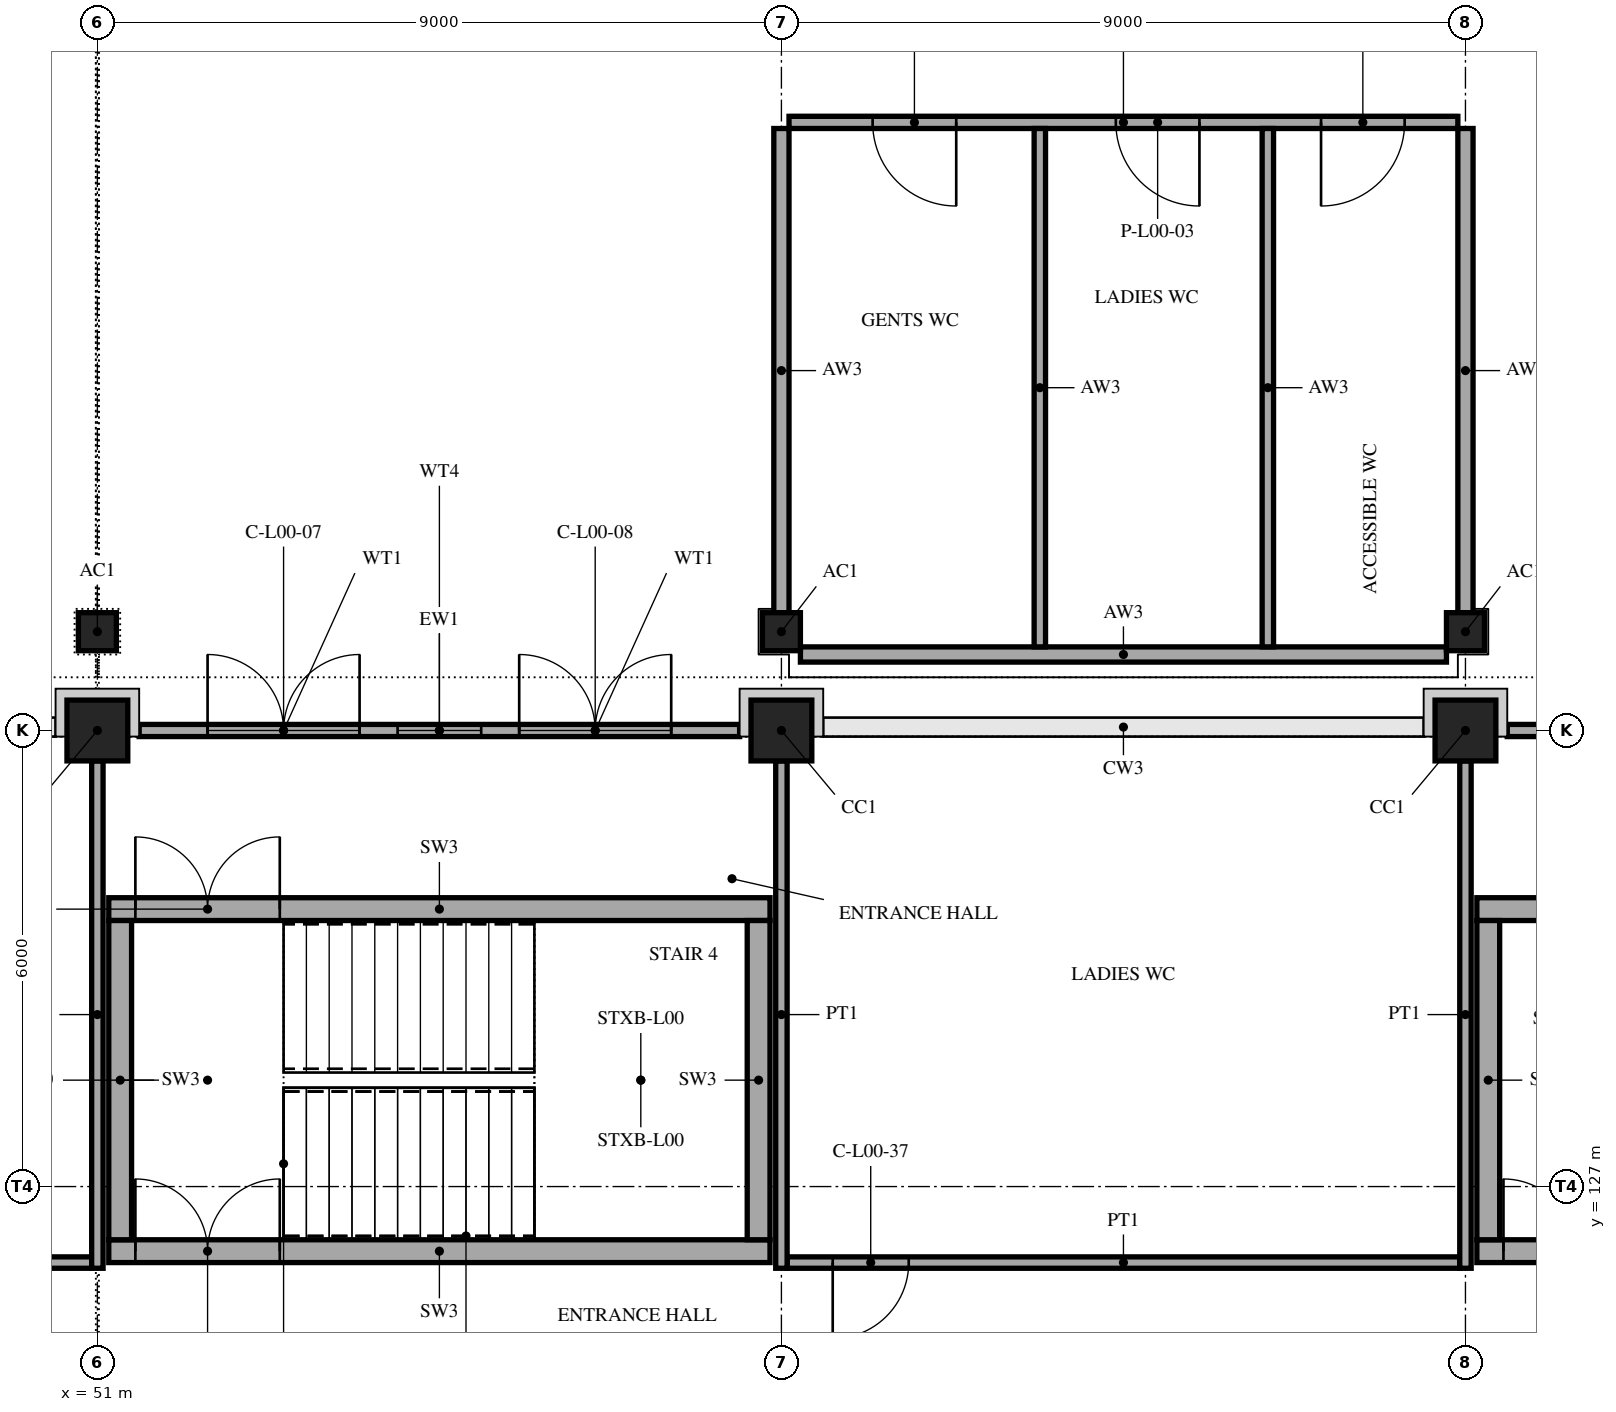
"""IFC4 building model, lengths in metres.
Left out: names, types, materials, properties, quantities, classifications, styles, units other than length and angle.
Written with IfcOpenShell. Run it as: python <this file> out.ifc"""

import sys

from ifc_helpers import new_model, si_unit, direction, frame, frame_2d, origin, origin_2d, place, context, subcontext, project, spatial, rectangle, extrude, element, fill, save


model = new_model("IFC4")
c1 = context("Model", 3, precision=1e-05, world=origin(), true_north=direction((0.0, 1.0)))
c2 = subcontext(c1, "Body", "Model", "MODEL_VIEW")
j1 = project(units=[si_unit("LENGTHUNIT", "METRE"), si_unit("PLANEANGLEUNIT", "RADIAN")], contexts=[c1])
p1 = place(None, origin())
s1 = spatial("IfcSite", under=j1, at=p1, CompositionType="ELEMENT")
p2 = place(p1, origin())
s2 = spatial("IfcBuilding", under=s1, at=p2, CompositionType="ELEMENT")
p3 = place(p2, origin())
s3 = spatial("IfcBuildingStorey", under=s2, at=p3, CompositionType="ELEMENT", Elevation=0.0)
for number, where, z_axis, x_axis in (
    (1, (51.0, 133.0, 0.0), (0.0, 0.0, 1.0), (1.0, 0.0, 0.0)),
    (2, (60.0, 133.0, 0.0), (0.0, 0.0, 1.0), (1.0, 0.0, 0.0)),
    (3, (69.0, 133.0, 0.0), (0.0, 0.0, 1.0), (1.0, 0.0, 0.0)),
):
    element("IfcColumn", number, at=place(p3, frame(where, z_axis=z_axis, x_axis=x_axis)), inside=s3, PredefinedType="COLUMN", context=c2, shape_type="SweptSolid", body=[
        extrude(rectangle(XDim=0.8, YDim=0.8, at=origin_2d()), origin(), (0.0, 0.0, 1.0), 5.0),
    ])
p4 = place(p3, frame((51.15, 126.15, 0.0), z_axis=(0.0, 0.0, 1.0), x_axis=(1.0, 0.0, 0.0)))
e4 = element("IfcWall", 4, at=p4, inside=s3, PredefinedType="SHEAR", context=c2, shape_type="SweptSolid", body=[
    extrude(rectangle(XDim=8.7, YDim=0.3, at=frame_2d((4.35, 0.0))), origin(), (0.0, 0.0, 1.0), 5.0),
])
p5 = place(p4, frame((0.35, 0.0, 0.0)))
e5 = element("IfcOpeningElement", 5, at=p5, cuts=e4, PredefinedType="OPENING", context=c2, shape_type="SweptSolid", body=[
    extrude(rectangle(XDim=1.9, YDim=2.1, at=frame_2d((0.95, 1.05))), frame((0.0, 0.16, 0.0), z_axis=(0.0, -1.0, 0.0), x_axis=(1.0, 0.0, 0.0)), (0.0, 0.0, 1.0), 0.32),
])
p6 = place(p3, frame((51.15, 130.65, 0.0), z_axis=(0.0, 0.0, 1.0), x_axis=(1.0, 0.0, 0.0)))
e6 = element("IfcWall", 6, at=p6, inside=s3, PredefinedType="SHEAR", context=c2, shape_type="SweptSolid", body=[
    extrude(rectangle(XDim=8.7, YDim=0.3, at=frame_2d((4.35, 0.0))), origin(), (0.0, 0.0, 1.0), 5.0),
])
p7 = place(p6, frame((0.35, 0.0, 0.0)))
e7 = element("IfcOpeningElement", 7, at=p7, cuts=e6, PredefinedType="OPENING", context=c2, shape_type="SweptSolid", body=[
    extrude(rectangle(XDim=1.9, YDim=2.1, at=frame_2d((0.95, 1.05))), frame((0.0, 0.16, 0.0), z_axis=(0.0, -1.0, 0.0), x_axis=(1.0, 0.0, 0.0)), (0.0, 0.0, 1.0), 0.32),
])
for number, where, z_axis, x_axis in (
    (8, (51.3, 126.3, 0.0), (0.0, 0.0, 1.0), (0.0, 1.0, 0.0)),
    (9, (59.7, 126.3, 0.0), (0.0, 0.0, 1.0), (0.0, 1.0, 0.0)),
):
    element("IfcWall", number, at=place(p3, frame(where, z_axis=z_axis, x_axis=x_axis)), inside=s3, PredefinedType="SHEAR", context=c2, shape_type="SweptSolid", body=[
        extrude(rectangle(XDim=4.2, YDim=0.3, at=frame_2d((2.1, 0.0))), origin(), (0.0, 0.0, 1.0), 5.0),
    ])
p8 = place(p3, frame((69.15, 126.15, 0.0), z_axis=(0.0, 0.0, 1.0), x_axis=(1.0, 0.0, 0.0)))
e10 = element("IfcWall", 10, at=p8, inside=s3, PredefinedType="SHEAR", context=c2, shape_type="SweptSolid", body=[
    extrude(rectangle(XDim=8.7, YDim=0.3, at=frame_2d((4.35, 0.0))), origin(), (0.0, 0.0, 1.0), 5.0),
])
p9 = place(p8, frame((0.35, 0.0, 0.0)))
e11 = element("IfcOpeningElement", 11, at=p9, cuts=e10, PredefinedType="OPENING", context=c2, shape_type="SweptSolid", body=[
    extrude(rectangle(XDim=1.9, YDim=2.1, at=frame_2d((0.95, 1.05))), frame((0.0, 0.16, 0.0), z_axis=(0.0, -1.0, 0.0), x_axis=(1.0, 0.0, 0.0)), (0.0, 0.0, 1.0), 0.32),
])
p10 = place(p3, frame((69.15, 130.65, 0.0), z_axis=(0.0, 0.0, 1.0), x_axis=(1.0, 0.0, 0.0)))
e12 = element("IfcWall", 12, at=p10, inside=s3, PredefinedType="SHEAR", context=c2, shape_type="SweptSolid", body=[
    extrude(rectangle(XDim=8.7, YDim=0.3, at=frame_2d((4.35, 0.0))), origin(), (0.0, 0.0, 1.0), 5.0),
])
p11 = place(p3, frame((69.3, 126.3, 0.0), z_axis=(0.0, 0.0, 1.0), x_axis=(0.0, 1.0, 0.0)))
e13 = element("IfcWall", 13, at=p11, inside=s3, PredefinedType="SHEAR", context=c2, shape_type="SweptSolid", body=[
    extrude(rectangle(XDim=4.2, YDim=0.3, at=frame_2d((2.1, 0.0))), origin(), (0.0, 0.0, 1.0), 5.0),
])
p12 = place(p3, frame((51.55, 133.0, 0.0), z_axis=(0.0, 0.0, 1.0), x_axis=(1.0, 0.0, 0.0)))
e14 = element("IfcWall", 14, at=p12, inside=s3, PredefinedType="STANDARD", context=c2, shape_type="SweptSolid", body=[
    extrude(rectangle(XDim=7.9, YDim=0.16, at=frame_2d((3.95, 0.0))), origin(), (0.0, 0.0, 1.0), 5.0),
])
p13 = place(p12, frame((0.9, 0.0, 0.0)))
e15 = element("IfcOpeningElement", 15, at=p13, cuts=e14, PredefinedType="OPENING", context=c2, shape_type="SweptSolid", body=[
    extrude(rectangle(XDim=2.0, YDim=2.4, at=frame_2d((1.0, 1.2))), frame((0.0, 0.09, 0.0), z_axis=(0.0, -1.0, 0.0), x_axis=(1.0, 0.0, 0.0)), (0.0, 0.0, 1.0), 0.18),
])
p14 = place(p12, frame((0.9, 0.0, 2.6)))
e16 = element("IfcOpeningElement", 16, at=p14, cuts=e14, PredefinedType="OPENING", context=c2, shape_type="SweptSolid", body=[
    extrude(rectangle(XDim=2.0, YDim=2.1, at=frame_2d((1.0, 1.05))), frame((0.0, 0.09, 0.0), z_axis=(0.0, -1.0, 0.0), x_axis=(1.0, 0.0, 0.0)), (0.0, 0.0, 1.0), 0.18),
])
p15 = place(p12, frame((5.0, 0.0, 0.0)))
e17 = element("IfcOpeningElement", 17, at=p15, cuts=e14, PredefinedType="OPENING", context=c2, shape_type="SweptSolid", body=[
    extrude(rectangle(XDim=2.0, YDim=2.4, at=frame_2d((1.0, 1.2))), frame((0.0, 0.09, 0.0), z_axis=(0.0, -1.0, 0.0), x_axis=(1.0, 0.0, 0.0)), (0.0, 0.0, 1.0), 0.18),
])
p16 = place(p12, frame((5.0, 0.0, 2.6)))
e18 = element("IfcOpeningElement", 18, at=p16, cuts=e14, PredefinedType="OPENING", context=c2, shape_type="SweptSolid", body=[
    extrude(rectangle(XDim=2.0, YDim=2.1, at=frame_2d((1.0, 1.05))), frame((0.0, 0.09, 0.0), z_axis=(0.0, -1.0, 0.0), x_axis=(1.0, 0.0, 0.0)), (0.0, 0.0, 1.0), 0.18),
])
p17 = place(p12, frame((3.4, 0.0, 0.9)))
e19 = element("IfcOpeningElement", 19, at=p17, cuts=e14, PredefinedType="OPENING", context=c2, shape_type="SweptSolid", body=[
    extrude(rectangle(XDim=1.1, YDim=3.8, at=frame_2d((0.55, 1.9))), frame((0.0, 0.09, 0.0), z_axis=(0.0, -1.0, 0.0), x_axis=(1.0, 0.0, 0.0)), (0.0, 0.0, 1.0), 0.18),
])
p18 = place(p3, frame((69.55, 133.0, 0.0), z_axis=(0.0, 0.0, 1.0), x_axis=(1.0, 0.0, 0.0)))
e20 = element("IfcWall", 20, at=p18, inside=s3, PredefinedType="STANDARD", context=c2, shape_type="SweptSolid", body=[
    extrude(rectangle(XDim=7.9, YDim=0.16, at=frame_2d((3.95, 0.0))), origin(), (0.0, 0.0, 1.0), 5.0),
])
p19 = place(p18, frame((0.9, 0.0, 0.0)))
e21 = element("IfcOpeningElement", 21, at=p19, cuts=e20, PredefinedType="OPENING", context=c2, shape_type="SweptSolid", body=[
    extrude(rectangle(XDim=2.0, YDim=2.4, at=frame_2d((1.0, 1.2))), frame((0.0, 0.09, 0.0), z_axis=(0.0, -1.0, 0.0), x_axis=(1.0, 0.0, 0.0)), (0.0, 0.0, 1.0), 0.18),
])
p20 = place(p18, frame((0.9, 0.0, 2.6)))
e22 = element("IfcOpeningElement", 22, at=p20, cuts=e20, PredefinedType="OPENING", context=c2, shape_type="SweptSolid", body=[
    extrude(rectangle(XDim=2.0, YDim=2.1, at=frame_2d((1.0, 1.05))), frame((0.0, 0.09, 0.0), z_axis=(0.0, -1.0, 0.0), x_axis=(1.0, 0.0, 0.0)), (0.0, 0.0, 1.0), 0.18),
])
p21 = place(p18, frame((5.0, 0.0, 0.0)))
e23 = element("IfcOpeningElement", 23, at=p21, cuts=e20, PredefinedType="OPENING", context=c2, shape_type="SweptSolid", body=[
    extrude(rectangle(XDim=2.0, YDim=2.4, at=frame_2d((1.0, 1.2))), frame((0.0, 0.09, 0.0), z_axis=(0.0, -1.0, 0.0), x_axis=(1.0, 0.0, 0.0)), (0.0, 0.0, 1.0), 0.18),
])
p22 = place(p18, frame((5.0, 0.0, 2.6)))
e24 = element("IfcOpeningElement", 24, at=p22, cuts=e20, PredefinedType="OPENING", context=c2, shape_type="SweptSolid", body=[
    extrude(rectangle(XDim=2.0, YDim=2.1, at=frame_2d((1.0, 1.05))), frame((0.0, 0.09, 0.0), z_axis=(0.0, -1.0, 0.0), x_axis=(1.0, 0.0, 0.0)), (0.0, 0.0, 1.0), 0.18),
])
p23 = place(p18, frame((3.4, 0.0, 0.9)))
e25 = element("IfcOpeningElement", 25, at=p23, cuts=e20, PredefinedType="OPENING", context=c2, shape_type="SweptSolid", body=[
    extrude(rectangle(XDim=1.1, YDim=3.8, at=frame_2d((0.55, 1.9))), frame((0.0, 0.09, 0.0), z_axis=(0.0, -1.0, 0.0), x_axis=(1.0, 0.0, 0.0)), (0.0, 0.0, 1.0), 0.18),
])
for number, where, z_axis, x_axis in (
    (26, (51.0, 134.3, -0.2), (0.0, 0.0, 1.0), (1.0, 0.0, 0.0)),
    (27, (60.0, 134.3, -0.2), (0.0, 0.0, 1.0), (1.0, 0.0, 0.0)),
    (28, (69.0, 134.3, -0.2), (0.0, 0.0, 1.0), (1.0, 0.0, 0.0)),
):
    element("IfcColumn", number, at=place(p3, frame(where, z_axis=z_axis, x_axis=x_axis)), inside=s3, PredefinedType="COLUMN", context=c2, shape_type="SweptSolid", body=[
        extrude(rectangle(XDim=0.5, YDim=0.5, at=origin_2d()), origin(), (0.0, 0.0, 1.0), 4.95),
    ])
p24 = place(p3, frame((60.25, 134.0, 0.0), z_axis=(0.0, 0.0, 1.0), x_axis=(1.0, 0.0, 0.0)))
e29 = element("IfcWall", 29, at=p24, inside=s3, PredefinedType="STANDARD", context=c2, shape_type="SweptSolid", body=[
    extrude(rectangle(XDim=8.5, YDim=0.2, at=frame_2d((4.25, 0.0))), origin(), (0.0, 0.0, 1.0), 4.05),
])
for number, where, z_axis, x_axis in (
    (30, (60.0, 134.55, 0.0), (0.0, 0.0, 1.0), (0.0, 1.0, 0.0)),
    (31, (69.0, 134.55, 0.0), (0.0, 0.0, 1.0), (0.0, 1.0, 0.0)),
):
    element("IfcWall", number, at=place(p3, frame(where, z_axis=z_axis, x_axis=x_axis)), inside=s3, PredefinedType="STANDARD", context=c2, shape_type="SweptSolid", body=[
        extrude(rectangle(XDim=6.37, YDim=0.2, at=frame_2d((3.185, 0.0))), origin(), (0.0, 0.0, 1.0), 3.75),
    ])
p25 = place(p3, frame((60.1, 141.0, 0.0), z_axis=(0.0, 0.0, 1.0), x_axis=(1.0, 0.0, 0.0)))
e32 = element("IfcWall", 32, at=p25, inside=s3, PredefinedType="STANDARD", context=c2, shape_type="SweptSolid", body=[
    extrude(rectangle(XDim=8.8, YDim=0.16, at=frame_2d((4.4, 0.0))), origin(), (0.0, 0.0, 1.0), 3.75),
])
p26 = place(p25, frame((1.1, 0.0, 0.0)))
e33 = element("IfcOpeningElement", 33, at=p26, cuts=e32, PredefinedType="OPENING", context=c2, shape_type="SweptSolid", body=[
    extrude(rectangle(XDim=1.1, YDim=2.1, at=frame_2d((0.55, 1.05))), frame((0.0, 0.09, 0.0), z_axis=(0.0, -1.0, 0.0), x_axis=(1.0, 0.0, 0.0)), (0.0, 0.0, 1.0), 0.18),
])
p27 = place(p25, frame((4.3, 0.0, 0.0)))
e34 = element("IfcOpeningElement", 34, at=p27, cuts=e32, PredefinedType="OPENING", context=c2, shape_type="SweptSolid", body=[
    extrude(rectangle(XDim=1.1, YDim=2.1, at=frame_2d((0.55, 1.05))), frame((0.0, 0.09, 0.0), z_axis=(0.0, -1.0, 0.0), x_axis=(1.0, 0.0, 0.0)), (0.0, 0.0, 1.0), 0.18),
])
p28 = place(p25, frame((7.0, 0.0, 0.0)))
e35 = element("IfcOpeningElement", 35, at=p28, cuts=e32, PredefinedType="OPENING", context=c2, shape_type="SweptSolid", body=[
    extrude(rectangle(XDim=1.1, YDim=2.1, at=frame_2d((0.55, 1.05))), frame((0.0, 0.09, 0.0), z_axis=(0.0, -1.0, 0.0), x_axis=(1.0, 0.0, 0.0)), (0.0, 0.0, 1.0), 0.18),
])
for number, where, z_axis, x_axis in (
    (36, (63.4, 134.1, 0.0), (0.0, 0.0, 1.0), (0.0, 1.0, 0.0)),
    (37, (66.4, 134.1, 0.0), (0.0, 0.0, 1.0), (0.0, 1.0, 0.0)),
):
    element("IfcWall", number, at=place(p3, frame(where, z_axis=z_axis, x_axis=x_axis)), inside=s3, PredefinedType="STANDARD", context=c2, shape_type="SweptSolid", body=[
        extrude(rectangle(XDim=6.82, YDim=0.15, at=frame_2d((3.41, 0.0))), origin(), (0.0, 0.0, 1.0), 3.75),
    ])
p29 = place(p3, frame((42.075, 126.0, 0.0), z_axis=(0.0, 0.0, 1.0), x_axis=(1.0, 0.0, 0.0)))
e38 = element("IfcWall", 38, at=p29, inside=s3, PredefinedType="PARTITIONING", context=c2, shape_type="SweptSolid", body=[
    extrude(rectangle(XDim=8.85, YDim=0.15, at=frame_2d((4.425, 0.0))), origin(), (0.0, 0.0, 1.0), 4.8),
])
p30 = place(p29, frame((0.6, 0.0, 0.0)))
e39 = element("IfcOpeningElement", 39, at=p30, cuts=e38, PredefinedType="OPENING", context=c2, shape_type="SweptSolid", body=[
    extrude(rectangle(XDim=1.0, YDim=2.1, at=frame_2d((0.5, 1.05))), frame((0.0, 0.085, 0.0), z_axis=(0.0, -1.0, 0.0), x_axis=(1.0, 0.0, 0.0)), (0.0, 0.0, 1.0), 0.17),
])
p31 = place(p3, frame((51.0, 125.925, 0.0), z_axis=(0.0, 0.0, 1.0), x_axis=(0.0, 1.0, 0.0)))
e40 = element("IfcWall", 40, at=p31, inside=s3, PredefinedType="PARTITIONING", context=c2, shape_type="SweptSolid", body=[
    extrude(rectangle(XDim=6.675, YDim=0.15, at=frame_2d((3.337, 0.0))), origin(), (0.0, 0.0, 1.0), 4.0),
])
p32 = place(p3, frame((60.075, 126.0, 0.0), z_axis=(0.0, 0.0, 1.0), x_axis=(1.0, 0.0, 0.0)))
e41 = element("IfcWall", 41, at=p32, inside=s3, PredefinedType="PARTITIONING", context=c2, shape_type="SweptSolid", body=[
    extrude(rectangle(XDim=8.85, YDim=0.15, at=frame_2d((4.425, 0.0))), origin(), (0.0, 0.0, 1.0), 4.8),
])
p33 = place(p32, frame((0.6, 0.0, 0.0)))
e42 = element("IfcOpeningElement", 42, at=p33, cuts=e41, PredefinedType="OPENING", context=c2, shape_type="SweptSolid", body=[
    extrude(rectangle(XDim=1.0, YDim=2.1, at=frame_2d((0.5, 1.05))), frame((0.0, 0.085, 0.0), z_axis=(0.0, -1.0, 0.0), x_axis=(1.0, 0.0, 0.0)), (0.0, 0.0, 1.0), 0.17),
])
for number, where, z_axis, x_axis in (
    (43, (60.0, 125.925, 0.0), (0.0, 0.0, 1.0), (0.0, 1.0, 0.0)),
    (44, (69.0, 125.925, 0.0), (0.0, 0.0, 1.0), (0.0, 1.0, 0.0)),
):
    element("IfcWall", number, at=place(p3, frame(where, z_axis=z_axis, x_axis=x_axis)), inside=s3, PredefinedType="PARTITIONING", context=c2, shape_type="SweptSolid", body=[
        extrude(rectangle(XDim=6.675, YDim=0.15, at=frame_2d((3.337, 0.0))), origin(), (0.0, 0.0, 1.0), 4.0),
    ])
p34 = place(p13, origin())
e45 = element("IfcDoor", 45, at=p34, inside=s3, OperationType="DOUBLE_DOOR_SINGLE_SWING", PredefinedType="NOTDEFINED", context=c2, shape_type="SweptSolid", body=[
    extrude(rectangle(XDim=2.0, YDim=2.4, at=frame_2d((1.0, 1.2))), frame((0.0, 0.025, 0.0), z_axis=(0.0, -1.0, 0.0), x_axis=(1.0, 0.0, 0.0)), (0.0, 0.0, 1.0), 0.05),
])
fill(e15, e45)
p35 = place(p14, origin())
e46 = element("IfcWindow", 46, at=p35, inside=s3, PartitioningType="SINGLE_PANEL", PredefinedType="WINDOW", context=c2, shape_type="SweptSolid", body=[
    extrude(rectangle(XDim=2.0, YDim=2.1, at=frame_2d((1.0, 1.05))), frame((0.0, 0.03, 0.0), z_axis=(0.0, -1.0, 0.0), x_axis=(1.0, 0.0, 0.0)), (0.0, 0.0, 1.0), 0.06),
])
fill(e16, e46)
p36 = place(p15, origin())
e47 = element("IfcDoor", 47, at=p36, inside=s3, OperationType="DOUBLE_DOOR_SINGLE_SWING", PredefinedType="NOTDEFINED", context=c2, shape_type="SweptSolid", body=[
    extrude(rectangle(XDim=2.0, YDim=2.4, at=frame_2d((1.0, 1.2))), frame((0.0, 0.025, 0.0), z_axis=(0.0, -1.0, 0.0), x_axis=(1.0, 0.0, 0.0)), (0.0, 0.0, 1.0), 0.05),
])
fill(e17, e47)
p37 = place(p16, origin())
e48 = element("IfcWindow", 48, at=p37, inside=s3, PartitioningType="SINGLE_PANEL", PredefinedType="WINDOW", context=c2, shape_type="SweptSolid", body=[
    extrude(rectangle(XDim=2.0, YDim=2.1, at=frame_2d((1.0, 1.05))), frame((0.0, 0.03, 0.0), z_axis=(0.0, -1.0, 0.0), x_axis=(1.0, 0.0, 0.0)), (0.0, 0.0, 1.0), 0.06),
])
fill(e18, e48)
p38 = place(p17, origin())
e49 = element("IfcWindow", 49, at=p38, inside=s3, PartitioningType="SINGLE_PANEL", PredefinedType="WINDOW", context=c2, shape_type="SweptSolid", body=[
    extrude(rectangle(XDim=1.1, YDim=3.8, at=frame_2d((0.55, 1.9))), frame((0.0, 0.03, 0.0), z_axis=(0.0, -1.0, 0.0), x_axis=(1.0, 0.0, 0.0)), (0.0, 0.0, 1.0), 0.06),
])
fill(e19, e49)
p39 = place(p26, frame((1.1, 0.0, 0.0), z_axis=(0.0, 0.0, 1.0), x_axis=(-1.0, 0.0, 0.0)))
e50 = element("IfcDoor", 50, at=p39, inside=s3, OperationType="SINGLE_SWING_LEFT", PredefinedType="NOTDEFINED", context=c2, shape_type="SweptSolid", body=[
    extrude(rectangle(XDim=1.1, YDim=2.1, at=frame_2d((0.55, 1.05))), frame((0.0, 0.025, 0.0), z_axis=(0.0, -1.0, 0.0), x_axis=(1.0, 0.0, 0.0)), (0.0, 0.0, 1.0), 0.05),
])
fill(e33, e50)
p40 = place(p27, frame((1.1, 0.0, 0.0), z_axis=(0.0, 0.0, 1.0), x_axis=(-1.0, 0.0, 0.0)))
e51 = element("IfcDoor", 51, at=p40, inside=s3, OperationType="SINGLE_SWING_LEFT", PredefinedType="NOTDEFINED", context=c2, shape_type="SweptSolid", body=[
    extrude(rectangle(XDim=1.1, YDim=2.1, at=frame_2d((0.55, 1.05))), frame((0.0, 0.025, 0.0), z_axis=(0.0, -1.0, 0.0), x_axis=(1.0, 0.0, 0.0)), (0.0, 0.0, 1.0), 0.05),
])
fill(e34, e51)
p41 = place(p28, frame((1.1, 0.0, 0.0), z_axis=(0.0, 0.0, 1.0), x_axis=(-1.0, 0.0, 0.0)))
e52 = element("IfcDoor", 52, at=p41, inside=s3, OperationType="SINGLE_SWING_RIGHT", PredefinedType="NOTDEFINED", context=c2, shape_type="SweptSolid", body=[
    extrude(rectangle(XDim=1.1, YDim=2.1, at=frame_2d((0.55, 1.05))), frame((0.0, 0.025, 0.0), z_axis=(0.0, -1.0, 0.0), x_axis=(1.0, 0.0, 0.0)), (0.0, 0.0, 1.0), 0.05),
])
fill(e35, e52)
p42 = place(p5, origin())
e53 = element("IfcDoor", 53, at=p42, inside=s3, OperationType="DOUBLE_DOOR_SINGLE_SWING", PredefinedType="NOTDEFINED", context=c2, shape_type="SweptSolid", body=[
    extrude(rectangle(XDim=1.9, YDim=2.1, at=frame_2d((0.95, 1.05))), frame((0.0, 0.025, 0.0), z_axis=(0.0, -1.0, 0.0), x_axis=(1.0, 0.0, 0.0)), (0.0, 0.0, 1.0), 0.05),
])
fill(e5, e53)
p43 = place(p9, origin())
e54 = element("IfcDoor", 54, at=p43, inside=s3, OperationType="DOUBLE_DOOR_SINGLE_SWING", PredefinedType="NOTDEFINED", context=c2, shape_type="SweptSolid", body=[
    extrude(rectangle(XDim=1.9, YDim=2.1, at=frame_2d((0.95, 1.05))), frame((0.0, 0.025, 0.0), z_axis=(0.0, -1.0, 0.0), x_axis=(1.0, 0.0, 0.0)), (0.0, 0.0, 1.0), 0.05),
])
fill(e11, e54)
p44 = place(p33, frame((1.0, 0.0, 0.0), z_axis=(0.0, 0.0, 1.0), x_axis=(-1.0, 0.0, 0.0)))
e55 = element("IfcDoor", 55, at=p44, inside=s3, OperationType="SINGLE_SWING_RIGHT", PredefinedType="NOTDEFINED", context=c2, shape_type="SweptSolid", body=[
    extrude(rectangle(XDim=1.0, YDim=2.1, at=frame_2d((0.5, 1.05))), frame((0.0, 0.025, 0.0), z_axis=(0.0, -1.0, 0.0), x_axis=(1.0, 0.0, 0.0)), (0.0, 0.0, 1.0), 0.05),
])
fill(e42, e55)
p45 = place(p7, origin())
e56 = element("IfcDoor", 56, at=p45, inside=s3, OperationType="DOUBLE_DOOR_SINGLE_SWING", PredefinedType="NOTDEFINED", context=c2, shape_type="SweptSolid", body=[
    extrude(rectangle(XDim=1.9, YDim=2.1, at=frame_2d((0.95, 1.05))), frame((0.0, 0.025, 0.0), z_axis=(0.0, -1.0, 0.0), x_axis=(1.0, 0.0, 0.0)), (0.0, 0.0, 1.0), 0.05),
])
fill(e7, e56)
save(model, sys.argv[1])
